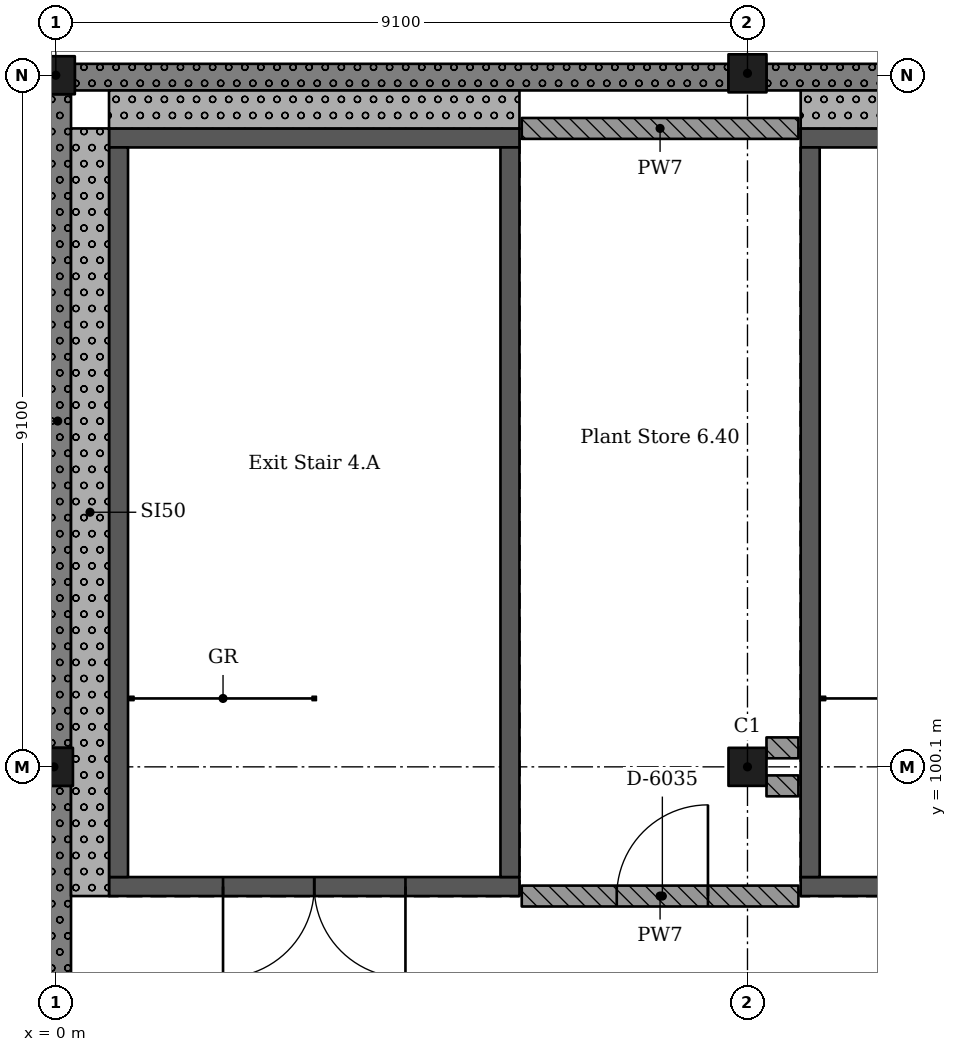
"""IFC4 building model, lengths in metres.
Left out: names, types, materials, properties, quantities, classifications, styles, units other than length and angle.
Written with IfcOpenShell. Run it as: python <this file> out.ifc"""

import sys

from ifc_helpers import new_model, si_unit, direction, frame, frame_2d, origin, origin_2d, place, context, subcontext, project, spatial, rectangle, extrude, element, fill, save


model = new_model("IFC4")
c1 = context("Model", 3, precision=1e-05, world=origin(), true_north=direction((0.0, 1.0)))
c2 = subcontext(c1, "Body", "Model", "MODEL_VIEW")
j1 = project(units=[si_unit("LENGTHUNIT", "METRE"), si_unit("PLANEANGLEUNIT", "RADIAN")], contexts=[c1])
p1 = place(None, origin())
s1 = spatial("IfcSite", under=j1, at=p1, CompositionType="ELEMENT")
p2 = place(p1, origin())
s2 = spatial("IfcBuilding", under=s1, at=p2, CompositionType="ELEMENT")
p3 = place(p2, frame((0.0, 0.0, 29.12)))
s3 = spatial("IfcBuildingStorey", under=s2, at=p3, CompositionType="ELEMENT", Elevation=29.12)
for number, where, z_axis, x_axis in (
    (1, (-0.025, 100.1, 0.0), (0.0, 0.0, 1.0), (1.0, 0.0, 0.0)),
    (2, (0.0, 109.2, 0.0), (0.0, 0.0, 1.0), (1.0, 0.0, 0.0)),
    (3, (9.1, 100.1, 0.0), (0.0, 0.0, 1.0), (1.0, 0.0, 0.0)),
    (4, (9.1, 109.225, 0.0), (0.0, 0.0, 1.0), (1.0, 0.0, 0.0)),
):
    element("IfcColumn", number, at=place(p3, frame(where, z_axis=z_axis, x_axis=x_axis)), inside=s3, PredefinedType="COLUMN", context=c2, shape_type="SweptSolid", body=[
        extrude(rectangle(XDim=0.5, YDim=0.5, at=origin_2d()), origin(), (0.0, 0.0, 1.0), 4.55),
    ])
p4 = place(p3, frame((6.1, 98.525, 0.0), z_axis=(0.0, 0.0, 1.0), x_axis=(-1.0, 0.0, 0.0)))
e5 = element("IfcWall", 5, at=p4, inside=s3, PredefinedType="SHEAR", context=c2, shape_type="SweptSolid", body=[
    extrude(rectangle(XDim=5.4, YDim=0.25, at=frame_2d((2.7, 0.0))), origin(), (0.0, 0.0, 1.0), 4.55),
])
p5 = place(p4, frame((1.5, 0.0, 0.0)))
e6 = element("IfcOpeningElement", 6, at=p5, cuts=e5, PredefinedType="OPENING", context=c2, shape_type="SweptSolid", body=[
    extrude(rectangle(XDim=2.4, YDim=2.1, at=frame_2d((1.2, 1.05))), frame((0.0, 0.135, 0.0), z_axis=(0.0, -1.0, 0.0), x_axis=(1.0, 0.0, 0.0)), (0.0, 0.0, 1.0), 0.27),
])
p6 = place(p3, frame((6.1, 108.375, 0.0), z_axis=(0.0, 0.0, 1.0), x_axis=(-1.0, 0.0, 0.0)))
e7 = element("IfcWall", 7, at=p6, inside=s3, PredefinedType="SHEAR", context=c2, shape_type="SweptSolid", body=[
    extrude(rectangle(XDim=5.4, YDim=0.25, at=frame_2d((2.7, 0.0))), origin(), (0.0, 0.0, 1.0), 4.55),
])
for number, where, z_axis, x_axis in (
    (8, (0.825, 108.25, 0.0), (0.0, 0.0, 1.0), (0.0, -1.0, 0.0)),
    (9, (5.975, 108.25, 0.0), (0.0, 0.0, 1.0), (0.0, -1.0, 0.0)),
):
    element("IfcWall", number, at=place(p3, frame(where, z_axis=z_axis, x_axis=x_axis)), inside=s3, PredefinedType="SHEAR", context=c2, shape_type="SweptSolid", body=[
        extrude(rectangle(XDim=9.6, YDim=0.25, at=frame_2d((4.8, 0.0))), origin(), (0.0, 0.0, 1.0), 4.55),
    ])
p7 = place(p3, frame((15.2, 98.525, 0.0), z_axis=(0.0, 0.0, 1.0), x_axis=(-1.0, 0.0, 0.0)))
e10 = element("IfcWall", 10, at=p7, inside=s3, PredefinedType="SHEAR", context=c2, shape_type="SweptSolid", body=[
    extrude(rectangle(XDim=5.4, YDim=0.25, at=frame_2d((2.7, 0.0))), origin(), (0.0, 0.0, 1.0), 4.55),
])
p8 = place(p7, frame((1.5, 0.0, 0.0)))
e11 = element("IfcOpeningElement", 11, at=p8, cuts=e10, PredefinedType="OPENING", context=c2, shape_type="SweptSolid", body=[
    extrude(rectangle(XDim=2.4, YDim=2.1, at=frame_2d((1.2, 1.05))), frame((0.0, 0.135, 0.0), z_axis=(0.0, -1.0, 0.0), x_axis=(1.0, 0.0, 0.0)), (0.0, 0.0, 1.0), 0.27),
])
p9 = place(p3, frame((15.2, 108.375, 0.0), z_axis=(0.0, 0.0, 1.0), x_axis=(-1.0, 0.0, 0.0)))
e12 = element("IfcWall", 12, at=p9, inside=s3, PredefinedType="SHEAR", context=c2, shape_type="SweptSolid", body=[
    extrude(rectangle(XDim=5.4, YDim=0.25, at=frame_2d((2.7, 0.0))), origin(), (0.0, 0.0, 1.0), 4.55),
])
p10 = place(p3, frame((9.925, 108.25, 0.0), z_axis=(0.0, 0.0, 1.0), x_axis=(0.0, -1.0, 0.0)))
e13 = element("IfcWall", 13, at=p10, inside=s3, PredefinedType="SHEAR", context=c2, shape_type="SweptSolid", body=[
    extrude(rectangle(XDim=9.6, YDim=0.25, at=frame_2d((4.8, 0.0))), origin(), (0.0, 0.0, 1.0), 4.55),
])
p11 = place(p3, frame((17.95, 109.175, 0.0), z_axis=(0.0, 0.0, 1.0), x_axis=(-1.0, 0.0, 0.0)))
e14 = element("IfcWall", 14, at=p11, inside=s3, PredefinedType="SOLIDWALL", context=c2, shape_type="SweptSolid", body=[
    extrude(rectangle(XDim=8.6, YDim=0.35, at=frame_2d((4.3, 0.0))), origin(), (0.0, 0.0, 1.0), 4.5),
])
p12 = place(p3, frame((8.85, 109.175, 0.0), z_axis=(0.0, 0.0, 1.0), x_axis=(-1.0, 0.0, 0.0)))
e15 = element("IfcWall", 15, at=p12, inside=s3, PredefinedType="SOLIDWALL", context=c2, shape_type="SweptSolid", body=[
    extrude(rectangle(XDim=8.6, YDim=0.35, at=frame_2d((4.3, 0.0))), origin(), (0.0, 0.0, 1.0), 4.5),
])
p13 = place(p3, frame((0.025, 108.95, 0.0), z_axis=(0.0, 0.0, 1.0), x_axis=(0.0, -1.0, 0.0)))
e16 = element("IfcWall", 16, at=p13, inside=s3, PredefinedType="SOLIDWALL", context=c2, shape_type="SweptSolid", body=[
    extrude(rectangle(XDim=8.6, YDim=0.35, at=frame_2d((4.3, 0.0))), origin(), (0.0, 0.0, 1.0), 4.5),
])
p14 = place(p3, frame((0.025, 99.85, 0.0), z_axis=(0.0, 0.0, 1.0), x_axis=(0.0, -1.0, 0.0)))
e17 = element("IfcWall", 17, at=p14, inside=s3, PredefinedType="SOLIDWALL", context=c2, shape_type="SweptSolid", body=[
    extrude(rectangle(XDim=8.6, YDim=0.35, at=frame_2d((4.3, 0.0))), origin(), (0.0, 0.0, 1.0), 4.5),
])
p15 = place(p3, frame((0.7, 108.75, 0.0), z_axis=(0.0, 0.0, 1.0), x_axis=(1.0, 0.0, 0.0)))
e18 = element("IfcWall", 18, at=p15, inside=s3, PredefinedType="SOLIDWALL", context=c2, shape_type="SweptSolid", body=[
    extrude(rectangle(XDim=5.4, YDim=0.5, at=frame_2d((2.7, 0.0))), origin(), (0.0, 0.0, 1.0), 3.88),
])
p16 = place(p3, frame((0.45, 98.4, 0.0), z_axis=(0.0, 0.0, 1.0), x_axis=(0.0, 1.0, 0.0)))
e19 = element("IfcWall", 19, at=p16, inside=s3, PredefinedType="SOLIDWALL", context=c2, shape_type="SweptSolid", body=[
    extrude(rectangle(XDim=10.1, YDim=0.5, at=frame_2d((5.05, 0.0))), origin(), (0.0, 0.0, 1.0), 3.88),
])
p17 = place(p3, frame((9.8, 108.75, 0.0), z_axis=(0.0, 0.0, 1.0), x_axis=(1.0, 0.0, 0.0)))
e20 = element("IfcWall", 20, at=p17, inside=s3, PredefinedType="SOLIDWALL", context=c2, shape_type="SweptSolid", body=[
    extrude(rectangle(XDim=5.4, YDim=0.5, at=frame_2d((2.7, 0.0))), origin(), (0.0, 0.0, 1.0), 3.88),
])
p18 = place(p3, frame((6.13, 98.4, 0.0), z_axis=(0.0, 0.0, 1.0), x_axis=(1.0, 0.0, 0.0)))
e21 = element("IfcWall", 21, at=p18, inside=s3, PredefinedType="SOLIDWALL", context=c2, shape_type="SweptSolid", body=[
    extrude(rectangle(XDim=3.64, YDim=0.275, at=frame_2d((1.82, 0.0))), origin(), (0.0, 0.0, 1.0), 3.88),
])
p19 = place(p18, frame((1.25, 0.0, 0.0)))
e22 = element("IfcOpeningElement", 22, at=p19, cuts=e21, PredefinedType="OPENING", context=c2, shape_type="SweptSolid", body=[
    extrude(rectangle(XDim=1.2, YDim=2.4, at=frame_2d((0.6, 1.2))), frame((0.0, 0.147, 0.0), z_axis=(0.0, -1.0, 0.0), x_axis=(1.0, 0.0, 0.0)), (0.0, 0.0, 1.0), 0.295),
])
p20 = place(p3, frame((6.13, 108.5, 0.0), z_axis=(0.0, 0.0, 1.0), x_axis=(1.0, 0.0, 0.0)))
e23 = element("IfcWall", 23, at=p20, inside=s3, PredefinedType="SOLIDWALL", context=c2, shape_type="SweptSolid", body=[
    extrude(rectangle(XDim=3.64, YDim=0.275, at=frame_2d((1.82, 0.0))), origin(), (0.0, 0.0, 1.0), 3.88),
])
for number, where, z_axis, x_axis in (
    (24, (9.35, 99.85, 0.0), (0.0, 0.0, 1.0), (1.0, 0.0, 0.0)),
    (25, (9.77, 100.35, 0.0), (0.0, 0.0, 1.0), (-1.0, 0.0, 0.0)),
):
    element("IfcWall", number, at=place(p3, frame(where, z_axis=z_axis, x_axis=x_axis)), inside=s3, PredefinedType="SOLIDWALL", context=c2, shape_type="SweptSolid", body=[
        extrude(rectangle(XDim=0.42, YDim=0.275, at=frame_2d((0.21, 0.0))), origin(), (0.0, 0.0, 1.0), 3.88),
    ])
p21 = place(p19, origin())
e26 = element("IfcDoor", 26, at=p21, inside=s3, OperationType="SINGLE_SWING_LEFT", PredefinedType="DOOR", context=c2, shape_type="SweptSolid", body=[
    extrude(rectangle(XDim=1.2, YDim=2.4, at=frame_2d((0.6, 1.2))), frame((0.0, 0.025, 0.0), z_axis=(0.0, -1.0, 0.0), x_axis=(1.0, 0.0, 0.0)), (0.0, 0.0, 1.0), 0.05),
])
fill(e22, e26)
p22 = place(p5, origin())
e27 = element("IfcDoor", 27, at=p22, inside=s3, OperationType="DOUBLE_DOOR_SINGLE_SWING", PredefinedType="DOOR", context=c2, shape_type="SweptSolid", body=[
    extrude(rectangle(XDim=2.4, YDim=2.1, at=frame_2d((1.2, 1.05))), frame((0.0, 0.025, 0.0), z_axis=(0.0, -1.0, 0.0), x_axis=(1.0, 0.0, 0.0)), (0.0, 0.0, 1.0), 0.05),
])
fill(e6, e27)
save(model, sys.argv[1])
